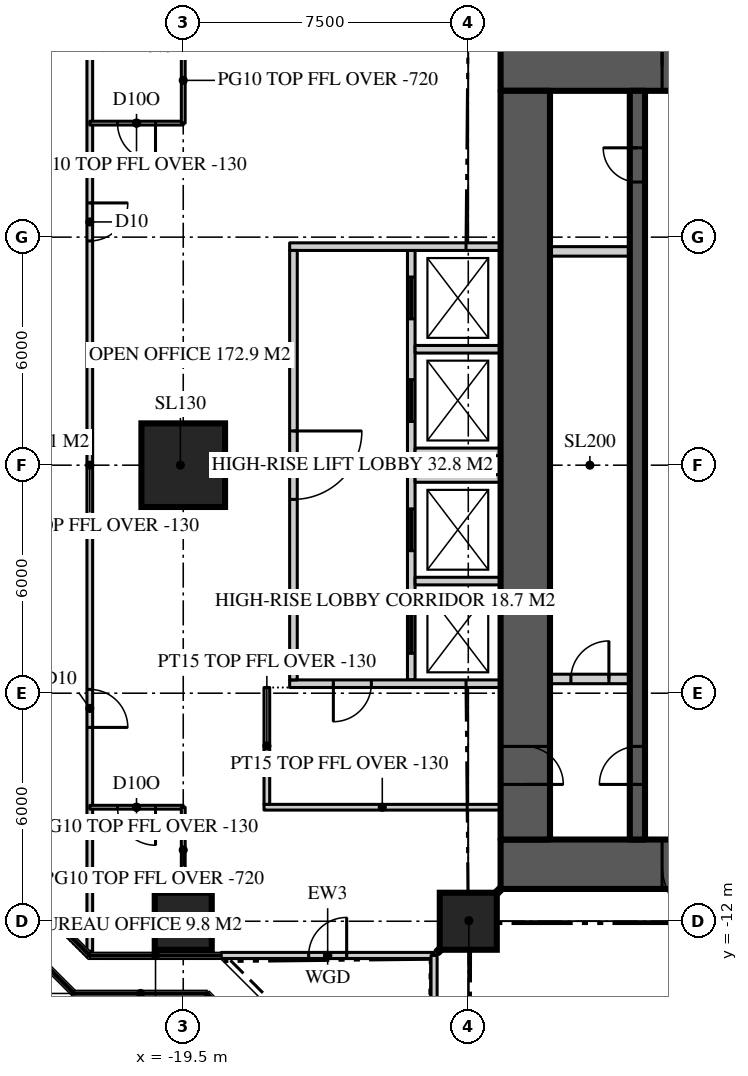
"""IFC4 building model, lengths in metres.
Left out: names, types, materials, properties, quantities, classifications, styles, units other than length and angle.
Written with IfcOpenShell. Run it as: python <this file> out.ifc"""

import sys

from ifc_helpers import new_model, si_unit, direction, frame, frame_2d, origin, origin_2d, place, context, subcontext, project, spatial, rectangle, extrude, element, fill, save


model = new_model("IFC4")
c1 = context("Model", 3, precision=1e-05, world=origin(), true_north=direction((0.0, 1.0)))
c2 = subcontext(c1, "Body", "Model", "MODEL_VIEW")
j1 = project(units=[si_unit("LENGTHUNIT", "METRE"), si_unit("PLANEANGLEUNIT", "RADIAN")], contexts=[c1])
p1 = place(None, origin())
s1 = spatial("IfcSite", under=j1, at=p1, CompositionType="ELEMENT")
p2 = place(p1, origin())
s2 = spatial("IfcBuilding", under=s1, at=p2, CompositionType="ELEMENT")
p3 = place(p2, frame((0.0, 0.0, 243.9)))
s3 = spatial("IfcBuildingStorey", under=s2, at=p3, CompositionType="ELEMENT", Elevation=243.9)
p4 = place(p3, frame((-11.15, 10.5, 0.0), z_axis=(0.0, 0.0, 1.0), x_axis=(1.0, 0.0, 0.0)))
e1 = element("IfcWall", 1, at=p4, inside=s3, PredefinedType="SHEAR", context=c2, shape_type="SweptSolid", body=[
    extrude(rectangle(XDim=22.3, YDim=1.3, at=frame_2d((11.15, 0.0))), origin(), (0.0, 0.0, 1.0), 3.9),
])
p5 = place(p4, frame((4.25, 0.0, 0.0)))
e2 = element("IfcOpeningElement", 2, at=p5, cuts=e1, PredefinedType="OPENING", context=c2, shape_type="SweptSolid", body=[
    extrude(rectangle(XDim=1.8, YDim=2.2, at=frame_2d((0.9, 1.1))), frame((0.0, 0.66, 0.0), z_axis=(0.0, -1.0, 0.0), x_axis=(1.0, 0.0, 0.0)), (0.0, 0.0, 1.0), 1.32),
])
p6 = place(p4, frame((16.25, 0.0, 0.0)))
e3 = element("IfcOpeningElement", 3, at=p6, cuts=e1, PredefinedType="OPENING", context=c2, shape_type="SweptSolid", body=[
    extrude(rectangle(XDim=1.8, YDim=2.2, at=frame_2d((0.9, 1.1))), frame((0.0, 0.66, 0.0), z_axis=(0.0, -1.0, 0.0), x_axis=(1.0, 0.0, 0.0)), (0.0, 0.0, 1.0), 1.32),
])
p7 = place(p3, frame((11.15, -10.5, 0.0), z_axis=(0.0, 0.0, 1.0), x_axis=(-1.0, 0.0, 0.0)))
e4 = element("IfcWall", 4, at=p7, inside=s3, PredefinedType="SHEAR", context=c2, shape_type="SweptSolid", body=[
    extrude(rectangle(XDim=22.3, YDim=1.3, at=frame_2d((11.15, 0.0))), origin(), (0.0, 0.0, 1.0), 3.9),
])
p8 = place(p7, frame((16.25, 0.0, 0.0)))
e5 = element("IfcOpeningElement", 5, at=p8, cuts=e4, PredefinedType="OPENING", context=c2, shape_type="SweptSolid", body=[
    extrude(rectangle(XDim=1.8, YDim=2.2, at=frame_2d((0.9, 1.1))), frame((0.0, 0.66, 0.0), z_axis=(0.0, -1.0, 0.0), x_axis=(1.0, 0.0, 0.0)), (0.0, 0.0, 1.0), 1.32),
])
p9 = place(p7, frame((4.25, 0.0, 0.0)))
e6 = element("IfcOpeningElement", 6, at=p9, cuts=e4, PredefinedType="OPENING", context=c2, shape_type="SweptSolid", body=[
    extrude(rectangle(XDim=1.8, YDim=2.2, at=frame_2d((0.9, 1.1))), frame((0.0, 0.66, 0.0), z_axis=(0.0, -1.0, 0.0), x_axis=(1.0, 0.0, 0.0)), (0.0, 0.0, 1.0), 1.32),
])
p10 = place(p3, frame((-10.5, 9.85, 0.0), z_axis=(0.0, 0.0, 1.0), x_axis=(0.0, -1.0, 0.0)))
e7 = element("IfcWall", 7, at=p10, inside=s3, PredefinedType="SHEAR", context=c2, shape_type="SweptSolid", body=[
    extrude(rectangle(XDim=19.7, YDim=1.3, at=frame_2d((9.85, 0.0))), origin(), (0.0, 0.0, 1.0), 3.9),
])
p11 = place(p10, frame((17.25, 0.0, 0.0)))
e8 = element("IfcOpeningElement", 8, at=p11, cuts=e7, PredefinedType="OPENING", context=c2, shape_type="SweptSolid", body=[
    extrude(rectangle(XDim=1.0, YDim=2.2, at=frame_2d((0.5, 1.1))), frame((0.0, 0.66, 0.0), z_axis=(0.0, -1.0, 0.0), x_axis=(1.0, 0.0, 0.0)), (0.0, 0.0, 1.0), 1.32),
])
for number, where, z_axis, x_axis in (
    (9, (-19.5, -12.0, 0.0), (0.0, 0.0, 1.0), (1.0, 0.0, 0.0)),
    (10, (-12.0, -12.0, 0.0), (0.0, 0.0, 1.0), (1.0, 0.0, 0.0)),
):
    element("IfcColumn", number, at=place(p3, frame(where, z_axis=z_axis, x_axis=x_axis)), inside=s3, PredefinedType="COLUMN", context=c2, shape_type="SweptSolid", body=[
        extrude(rectangle(XDim=1.5, YDim=1.5, at=origin_2d()), origin(), (0.0, 0.0, 1.0), 3.9),
    ])
p12 = place(p3, frame((-19.5, 0.0, 0.0), z_axis=(0.0, 0.0, 1.0), x_axis=(1.0, 0.0, 0.0)))
e11 = element("IfcColumn", 11, at=p12, inside=s3, PredefinedType="COLUMN", context=c2, shape_type="SweptSolid", body=[
    extrude(rectangle(XDim=2.2, YDim=2.2, at=origin_2d()), origin(), (0.0, 0.0, 1.0), 3.9),
])
p13 = place(p3, frame((-18.5, -12.9, 0.0), z_axis=(0.0, 0.0, 1.0), x_axis=(1.0, 0.0, 0.0)))
e12 = element("IfcWall", 12, at=p13, inside=s3, PredefinedType="SOLIDWALL", context=c2, shape_type="SweptSolid", body=[
    extrude(rectangle(XDim=5.6, YDim=0.16, at=frame_2d((2.8, 0.0))), origin(), (0.0, 0.0, 1.0), 3.77),
])
p14 = place(p13, frame((2.3, 0.0, 0.0)))
e13 = element("IfcOpeningElement", 13, at=p14, cuts=e12, PredefinedType="OPENING", context=c2, shape_type="SweptSolid", body=[
    extrude(rectangle(XDim=1.0, YDim=2.2, at=frame_2d((0.5, 1.1))), frame((0.0, 0.09, 0.0), z_axis=(0.0, -1.0, 0.0), x_axis=(1.0, 0.0, 0.0)), (0.0, 0.0, 1.0), 0.18),
])
p15 = place(p3, frame((-12.9, -12.9, 0.0), z_axis=(0.0, 0.0, 1.0), x_axis=(0.0, -1.0, 0.0)))
e14 = element("IfcWall", 14, at=p15, inside=s3, PredefinedType="SOLIDWALL", context=c2, shape_type="SweptSolid", body=[
    extrude(rectangle(XDim=5.6, YDim=0.16, at=frame_2d((2.8, 0.0))), origin(), (0.0, 0.0, 1.0), 3.77),
])
p16 = place(p3, frame((-7.55, -9.85, 0.0), z_axis=(0.0, 0.0, 1.0), x_axis=(0.0, 1.0, 0.0)))
e15 = element("IfcWall", 15, at=p16, inside=s3, PredefinedType="SHEAR", context=c2, shape_type="SweptSolid", body=[
    extrude(rectangle(XDim=19.7, YDim=0.4, at=frame_2d((9.85, 0.0))), origin(), (0.0, 0.0, 1.0), 3.9),
])
p17 = place(p16, frame((1.45, 0.0, 0.0)))
e16 = element("IfcOpeningElement", 16, at=p17, cuts=e15, PredefinedType="OPENING", context=c2, shape_type="SweptSolid", body=[
    extrude(rectangle(XDim=1.0, YDim=2.2, at=frame_2d((0.5, 1.1))), frame((0.0, 0.21, 0.0), z_axis=(0.0, -1.0, 0.0), x_axis=(1.0, 0.0, 0.0)), (0.0, 0.0, 1.0), 0.42),
])
p18 = place(p16, frame((17.3, 0.0, 0.0)))
e17 = element("IfcOpeningElement", 17, at=p18, cuts=e15, PredefinedType="OPENING", context=c2, shape_type="SweptSolid", body=[
    extrude(rectangle(XDim=0.9, YDim=2.1, at=frame_2d((0.45, 1.05))), frame((0.0, 0.21, 0.0), z_axis=(0.0, -1.0, 0.0), x_axis=(1.0, 0.0, 0.0)), (0.0, 0.0, 1.0), 0.42),
])
p19 = place(p3, frame((-9.85, 5.625, 0.0), z_axis=(0.0, 0.0, 1.0), x_axis=(1.0, 0.0, 0.0)))
e18 = element("IfcWall", 18, at=p19, inside=s3, PredefinedType="SOLIDWALL", context=c2, shape_type="SweptSolid", body=[
    extrude(rectangle(XDim=2.1, YDim=0.25, at=frame_2d((1.05, 0.0))), origin(), (0.0, 0.0, 1.0), 3.7),
])
p20 = place(p3, frame((-9.85, -5.625, 0.0), z_axis=(0.0, 0.0, 1.0), x_axis=(1.0, 0.0, 0.0)))
e19 = element("IfcWall", 19, at=p20, inside=s3, PredefinedType="SOLIDWALL", context=c2, shape_type="SweptSolid", body=[
    extrude(rectangle(XDim=2.1, YDim=0.25, at=frame_2d((1.05, 0.0))), origin(), (0.0, 0.0, 1.0), 3.7),
])
p21 = place(p20, frame((0.55, 0.0, 0.0)))
e20 = element("IfcOpeningElement", 20, at=p21, cuts=e19, PredefinedType="OPENING", context=c2, shape_type="SweptSolid", body=[
    extrude(rectangle(XDim=1.0, YDim=2.2, at=frame_2d((0.5, 1.1))), frame((0.0, 0.135, 0.0), z_axis=(0.0, -1.0, 0.0), x_axis=(1.0, 0.0, 0.0)), (0.0, 0.0, 1.0), 0.27),
])
p22 = place(p3, frame((-21.959, 12.786, 0.0), z_axis=(0.0, 0.0, 1.0), x_axis=(0.0, -1.0, 0.0)))
e21 = element("IfcWall", 21, at=p22, inside=s3, PredefinedType="PARTITIONING", context=c2, shape_type="SweptSolid", body=[
    extrude(rectangle(XDim=25.573, YDim=0.15, at=frame_2d((12.786, 0.0))), origin(), (0.0, 0.0, 1.0), 3.77),
])
p23 = place(p22, frame((18.687, 0.0, 0.0)))
e22 = element("IfcOpeningElement", 22, at=p23, cuts=e21, PredefinedType="OPENING", context=c2, shape_type="SweptSolid", body=[
    extrude(rectangle(XDim=1.0, YDim=2.2, at=frame_2d((0.5, 1.1))), frame((0.0, 0.085, 0.0), z_axis=(0.0, -1.0, 0.0), x_axis=(1.0, 0.0, 0.0)), (0.0, 0.0, 1.0), 0.17),
])
p24 = place(p22, frame((5.886, 0.0, 0.0)))
e23 = element("IfcOpeningElement", 23, at=p24, cuts=e21, PredefinedType="OPENING", context=c2, shape_type="SweptSolid", body=[
    extrude(rectangle(XDim=1.0, YDim=2.2, at=frame_2d((0.5, 1.1))), frame((0.0, 0.085, 0.0), z_axis=(0.0, -1.0, 0.0), x_axis=(1.0, 0.0, 0.0)), (0.0, 0.0, 1.0), 0.17),
])
p25 = place(p3, frame((-19.5, -9.0, 0.0), z_axis=(0.0, 0.0, 1.0), x_axis=(-1.0, 0.0, 0.0)))
e24 = element("IfcWall", 24, at=p25, inside=s3, PredefinedType="PARTITIONING", context=c2, shape_type="SweptSolid", body=[
    extrude(rectangle(XDim=2.459, YDim=0.1, at=frame_2d((1.229, 0.0))), origin(), (0.0, 0.0, 1.0), 3.77),
])
p26 = place(p25, frame((0.729, 0.0, 0.0)))
e25 = element("IfcOpeningElement", 25, at=p26, cuts=e24, PredefinedType="OPENING", context=c2, shape_type="SweptSolid", body=[
    extrude(rectangle(XDim=1.0, YDim=2.2, at=frame_2d((0.5, 1.1))), frame((0.0, 0.06, 0.0), z_axis=(0.0, -1.0, 0.0), x_axis=(1.0, 0.0, 0.0)), (0.0, 0.0, 1.0), 0.12),
])
p27 = place(p3, frame((-19.5, -9.0, 0.0), z_axis=(0.0, 0.0, 1.0), x_axis=(0.0, -1.0, 0.0)))
e26 = element("IfcWall", 26, at=p27, inside=s3, PredefinedType="PARTITIONING", context=c2, shape_type="SweptSolid", body=[
    extrude(rectangle(XDim=2.25, YDim=0.1, at=frame_2d((1.125, 0.0))), origin(), (0.0, 0.0, 1.0), 3.18),
])
p28 = place(p3, frame((-19.5, 9.0, 0.0), z_axis=(0.0, 0.0, 1.0), x_axis=(-1.0, 0.0, 0.0)))
e27 = element("IfcWall", 27, at=p28, inside=s3, PredefinedType="PARTITIONING", context=c2, shape_type="SweptSolid", body=[
    extrude(rectangle(XDim=2.459, YDim=0.1, at=frame_2d((1.229, 0.0))), origin(), (0.0, 0.0, 1.0), 3.77),
])
p29 = place(p28, frame((0.729, 0.0, 0.0)))
e28 = element("IfcOpeningElement", 28, at=p29, cuts=e27, PredefinedType="OPENING", context=c2, shape_type="SweptSolid", body=[
    extrude(rectangle(XDim=1.0, YDim=2.2, at=frame_2d((0.5, 1.1))), frame((0.0, 0.06, 0.0), z_axis=(0.0, -1.0, 0.0), x_axis=(1.0, 0.0, 0.0)), (0.0, 0.0, 1.0), 0.12),
])
p30 = place(p3, frame((-19.5, 9.0, 0.0), z_axis=(0.0, 0.0, 1.0), x_axis=(0.0, 1.0, 0.0)))
e29 = element("IfcWall", 29, at=p30, inside=s3, PredefinedType="PARTITIONING", context=c2, shape_type="SweptSolid", body=[
    extrude(rectangle(XDim=2.25, YDim=0.1, at=frame_2d((1.125, 0.0))), origin(), (0.0, 0.0, 1.0), 3.18),
])
p31 = place(p3, frame((-13.5, 5.65, 0.0), z_axis=(0.0, 0.0, 1.0), x_axis=(0.0, -1.0, 0.0)))
e30 = element("IfcWall", 30, at=p31, inside=s3, PredefinedType="SOLIDWALL", context=c2, shape_type="SweptSolid", body=[
    extrude(rectangle(XDim=11.3, YDim=0.2, at=frame_2d((5.65, 0.0))), origin(), (0.0, 0.0, 1.0), 3.7),
])
p32 = place(p31, frame((0.7, 0.0, 0.0)))
e31 = element("IfcOpeningElement", 31, at=p32, cuts=e30, PredefinedType="OPENING", context=c2, shape_type="SweptSolid", body=[
    extrude(rectangle(XDim=1.1, YDim=2.2, at=frame_2d((0.55, 1.1))), frame((0.0, 0.11, 0.0), z_axis=(0.0, -1.0, 0.0), x_axis=(1.0, 0.0, 0.0)), (0.0, 0.0, 1.0), 0.22),
])
p33 = place(p31, frame((3.4, 0.0, 0.0)))
e32 = element("IfcOpeningElement", 32, at=p33, cuts=e30, PredefinedType="OPENING", context=c2, shape_type="SweptSolid", body=[
    extrude(rectangle(XDim=1.1, YDim=2.2, at=frame_2d((0.55, 1.1))), frame((0.0, 0.11, 0.0), z_axis=(0.0, -1.0, 0.0), x_axis=(1.0, 0.0, 0.0)), (0.0, 0.0, 1.0), 0.22),
])
p34 = place(p31, frame((6.8, 0.0, 0.0)))
e33 = element("IfcOpeningElement", 33, at=p34, cuts=e30, PredefinedType="OPENING", context=c2, shape_type="SweptSolid", body=[
    extrude(rectangle(XDim=1.1, YDim=2.2, at=frame_2d((0.55, 1.1))), frame((0.0, 0.11, 0.0), z_axis=(0.0, -1.0, 0.0), x_axis=(1.0, 0.0, 0.0)), (0.0, 0.0, 1.0), 0.22),
])
p35 = place(p31, frame((9.5, 0.0, 0.0)))
e34 = element("IfcOpeningElement", 34, at=p35, cuts=e30, PredefinedType="OPENING", context=c2, shape_type="SweptSolid", body=[
    extrude(rectangle(XDim=1.1, YDim=2.2, at=frame_2d((0.55, 1.1))), frame((0.0, 0.11, 0.0), z_axis=(0.0, -1.0, 0.0), x_axis=(1.0, 0.0, 0.0)), (0.0, 0.0, 1.0), 0.22),
])
p36 = place(p3, frame((-11.15, 5.75, 0.0), z_axis=(0.0, 0.0, 1.0), x_axis=(-1.0, 0.0, 0.0)))
e35 = element("IfcWall", 35, at=p36, inside=s3, PredefinedType="SOLIDWALL", context=c2, shape_type="SweptSolid", body=[
    extrude(rectangle(XDim=5.55, YDim=0.2, at=frame_2d((2.775, 0.0))), origin(), (0.0, 0.0, 1.0), 3.7),
])
p37 = place(p3, frame((-11.15, -5.75, 0.0), z_axis=(0.0, 0.0, 1.0), x_axis=(-1.0, 0.0, 0.0)))
e36 = element("IfcWall", 36, at=p37, inside=s3, PredefinedType="SOLIDWALL", context=c2, shape_type="SweptSolid", body=[
    extrude(rectangle(XDim=5.55, YDim=0.2, at=frame_2d((2.775, 0.0))), origin(), (0.0, 0.0, 1.0), 3.7),
])
p38 = place(p37, frame((3.4, 0.0, 0.0)))
e37 = element("IfcOpeningElement", 37, at=p38, cuts=e36, PredefinedType="OPENING", context=c2, shape_type="SweptSolid", body=[
    extrude(rectangle(XDim=1.0, YDim=2.2, at=frame_2d((0.5, 1.1))), frame((0.0, 0.11, 0.0), z_axis=(0.0, -1.0, 0.0), x_axis=(1.0, 0.0, 0.0)), (0.0, 0.0, 1.0), 0.22),
])
for number, where, z_axis, x_axis in (
    (38, (-11.15, 3.05, 0.0), (0.0, 0.0, 1.0), (-1.0, 0.0, 0.0)),
    (39, (-11.15, 0.35, 0.0), (0.0, 0.0, 1.0), (-1.0, 0.0, 0.0)),
    (40, (-11.15, -0.35, 0.0), (0.0, 0.0, 1.0), (-1.0, 0.0, 0.0)),
    (41, (-11.15, -3.05, 0.0), (0.0, 0.0, 1.0), (-1.0, 0.0, 0.0)),
):
    element("IfcWall", number, at=place(p3, frame(where, z_axis=z_axis, x_axis=x_axis)), inside=s3, PredefinedType="SOLIDWALL", context=c2, shape_type="SweptSolid", body=[
        extrude(rectangle(XDim=2.25, YDim=0.2, at=frame_2d((1.125, 0.0))), origin(), (0.0, 0.0, 1.0), 3.7),
    ])
p39 = place(p3, frame((-16.6, 5.65, 0.0), z_axis=(0.0, 0.0, 1.0), x_axis=(0.0, -1.0, 0.0)))
e42 = element("IfcWall", 42, at=p39, inside=s3, PredefinedType="SOLIDWALL", context=c2, shape_type="SweptSolid", body=[
    extrude(rectangle(XDim=11.3, YDim=0.2, at=frame_2d((5.65, 0.0))), origin(), (0.0, 0.0, 1.0), 3.18),
])
p40 = place(p39, frame((4.75, 0.0, 0.0)))
e43 = element("IfcOpeningElement", 43, at=p40, cuts=e42, PredefinedType="OPENING", context=c2, shape_type="SweptSolid", body=[
    extrude(rectangle(XDim=1.8, YDim=2.2, at=frame_2d((0.9, 1.1))), frame((0.0, 0.11, 0.0), z_axis=(0.0, -1.0, 0.0), x_axis=(1.0, 0.0, 0.0)), (0.0, 0.0, 1.0), 0.22),
])
p41 = place(p3, frame((-11.15, -11.15, 0.0), z_axis=(0.0, 0.0, 1.0), x_axis=(-0.707106781187, -0.707106781187, 0.0)))
e44 = element("IfcWall", 44, at=p41, inside=s3, PredefinedType="PARTITIONING", context=c2, shape_type="SweptSolid", body=[
    extrude(rectangle(XDim=2.362, YDim=0.15, at=frame_2d((1.181, 0.0))), origin(), (0.0, 0.0, 1.0), 3.22),
])
p42 = place(p3, frame((-11.15, -9.0, 0.0), z_axis=(0.0, 0.0, 1.0), x_axis=(-1.0, 0.0, 0.0)))
e45 = element("IfcWall", 45, at=p42, inside=s3, PredefinedType="PARTITIONING", context=c2, shape_type="SweptSolid", body=[
    extrude(rectangle(XDim=6.225, YDim=0.15, at=frame_2d((3.113, 0.0))), origin(), (0.0, 0.0, 1.0), 3.77),
])
p43 = place(p3, frame((-17.3, -5.85, 0.0), z_axis=(0.0, 0.0, 1.0), x_axis=(0.0, -1.0, 0.0)))
e46 = element("IfcWall", 46, at=p43, inside=s3, PredefinedType="PARTITIONING", context=c2, shape_type="SweptSolid", body=[
    extrude(rectangle(XDim=3.075, YDim=0.15, at=frame_2d((1.538, 0.0))), origin(), (0.0, 0.0, 1.0), 3.77),
])
p44 = place(p14, origin())
e47 = element("IfcDoor", 47, at=p44, inside=s3, OperationType="SINGLE_SWING_RIGHT", PredefinedType="DOOR", context=c2, shape_type="SweptSolid", body=[
    extrude(rectangle(XDim=1.0, YDim=2.2, at=frame_2d((0.5, 1.1))), frame((0.0, 0.025, 0.0), z_axis=(0.0, -1.0, 0.0), x_axis=(1.0, 0.0, 0.0)), (0.0, 0.0, 1.0), 0.05),
])
fill(e13, e47)
p45 = place(p5, origin())
e48 = element("IfcDoor", 48, at=p45, inside=s3, OperationType="DOUBLE_DOOR_DOUBLE_SWING", PredefinedType="DOOR", context=c2, shape_type="SweptSolid", body=[
    extrude(rectangle(XDim=1.8, YDim=2.2, at=frame_2d((0.9, 1.1))), frame((0.0, 0.025, 0.0), z_axis=(0.0, -1.0, 0.0), x_axis=(1.0, 0.0, 0.0)), (0.0, 0.0, 1.0), 0.05),
])
fill(e2, e48)
p46 = place(p8, origin())
e49 = element("IfcDoor", 49, at=p46, inside=s3, OperationType="DOUBLE_DOOR_DOUBLE_SWING", PredefinedType="DOOR", context=c2, shape_type="SweptSolid", body=[
    extrude(rectangle(XDim=1.8, YDim=2.2, at=frame_2d((0.9, 1.1))), frame((0.0, 0.025, 0.0), z_axis=(0.0, -1.0, 0.0), x_axis=(1.0, 0.0, 0.0)), (0.0, 0.0, 1.0), 0.05),
])
fill(e5, e49)
p47 = place(p17, origin())
e50 = element("IfcDoor", 50, at=p47, inside=s3, OperationType="SINGLE_SWING_LEFT", PredefinedType="DOOR", context=c2, shape_type="SweptSolid", body=[
    extrude(rectangle(XDim=1.0, YDim=2.2, at=frame_2d((0.5, 1.1))), frame((0.0, 0.025, 0.0), z_axis=(0.0, -1.0, 0.0), x_axis=(1.0, 0.0, 0.0)), (0.0, 0.0, 1.0), 0.05),
])
fill(e16, e50)
p48 = place(p11, origin())
e51 = element("IfcDoor", 51, at=p48, inside=s3, OperationType="SINGLE_SWING_RIGHT", PredefinedType="DOOR", context=c2, shape_type="SweptSolid", body=[
    extrude(rectangle(XDim=1.0, YDim=2.2, at=frame_2d((0.5, 1.1))), frame((0.0, 0.025, 0.0), z_axis=(0.0, -1.0, 0.0), x_axis=(1.0, 0.0, 0.0)), (0.0, 0.0, 1.0), 0.05),
])
fill(e8, e51)
p49 = place(p18, origin())
e52 = element("IfcDoor", 52, at=p49, inside=s3, OperationType="SINGLE_SWING_RIGHT", PredefinedType="DOOR", context=c2, shape_type="SweptSolid", body=[
    extrude(rectangle(XDim=0.9, YDim=2.1, at=frame_2d((0.45, 1.05))), frame((0.0, 0.025, 0.0), z_axis=(0.0, -1.0, 0.0), x_axis=(1.0, 0.0, 0.0)), (0.0, 0.0, 1.0), 0.05),
])
fill(e17, e52)
p50 = place(p23, origin())
e53 = element("IfcDoor", 53, at=p50, inside=s3, OperationType="SINGLE_SWING_RIGHT", PredefinedType="DOOR", context=c2, shape_type="SweptSolid", body=[
    extrude(rectangle(XDim=1.0, YDim=2.2, at=frame_2d((0.5, 1.1))), frame((0.0, 0.025, 0.0), z_axis=(0.0, -1.0, 0.0), x_axis=(1.0, 0.0, 0.0)), (0.0, 0.0, 1.0), 0.05),
])
fill(e22, e53)
p51 = place(p24, origin())
e54 = element("IfcDoor", 54, at=p51, inside=s3, OperationType="SINGLE_SWING_LEFT", PredefinedType="DOOR", context=c2, shape_type="SweptSolid", body=[
    extrude(rectangle(XDim=1.0, YDim=2.2, at=frame_2d((0.5, 1.1))), frame((0.0, 0.025, 0.0), z_axis=(0.0, -1.0, 0.0), x_axis=(1.0, 0.0, 0.0)), (0.0, 0.0, 1.0), 0.05),
])
fill(e23, e54)
p52 = place(p26, origin())
e55 = element("IfcDoor", 55, at=p52, inside=s3, OperationType="SINGLE_SWING_LEFT", PredefinedType="DOOR", context=c2, shape_type="SweptSolid", body=[
    extrude(rectangle(XDim=1.0, YDim=2.2, at=frame_2d((0.5, 1.1))), frame((0.0, 0.025, 0.0), z_axis=(0.0, -1.0, 0.0), x_axis=(1.0, 0.0, 0.0)), (0.0, 0.0, 1.0), 0.05),
])
fill(e25, e55)
p53 = place(p29, origin())
e56 = element("IfcDoor", 56, at=p53, inside=s3, OperationType="SINGLE_SWING_LEFT", PredefinedType="DOOR", context=c2, shape_type="SweptSolid", body=[
    extrude(rectangle(XDim=1.0, YDim=2.2, at=frame_2d((0.5, 1.1))), frame((0.0, 0.025, 0.0), z_axis=(0.0, -1.0, 0.0), x_axis=(1.0, 0.0, 0.0)), (0.0, 0.0, 1.0), 0.05),
])
fill(e28, e56)
p54 = place(p40, origin())
e57 = element("IfcDoor", 57, at=p54, inside=s3, OperationType="DOUBLE_DOOR_DOUBLE_SWING", PredefinedType="DOOR", context=c2, shape_type="SweptSolid", body=[
    extrude(rectangle(XDim=1.8, YDim=2.2, at=frame_2d((0.9, 1.1))), frame((0.0, 0.025, 0.0), z_axis=(0.0, -1.0, 0.0), x_axis=(1.0, 0.0, 0.0)), (0.0, 0.0, 1.0), 0.05),
])
fill(e43, e57)
p55 = place(p32, origin())
e58 = element("IfcDoor", 58, at=p55, inside=s3, OperationType="SLIDING_TO_LEFT", PredefinedType="DOOR", context=c2, shape_type="SweptSolid", body=[
    extrude(rectangle(XDim=1.1, YDim=2.2, at=frame_2d((0.55, 1.1))), frame((0.0, 0.025, 0.0), z_axis=(0.0, -1.0, 0.0), x_axis=(1.0, 0.0, 0.0)), (0.0, 0.0, 1.0), 0.05),
])
fill(e31, e58)
p56 = place(p33, origin())
e59 = element("IfcDoor", 59, at=p56, inside=s3, OperationType="SLIDING_TO_LEFT", PredefinedType="DOOR", context=c2, shape_type="SweptSolid", body=[
    extrude(rectangle(XDim=1.1, YDim=2.2, at=frame_2d((0.55, 1.1))), frame((0.0, 0.025, 0.0), z_axis=(0.0, -1.0, 0.0), x_axis=(1.0, 0.0, 0.0)), (0.0, 0.0, 1.0), 0.05),
])
fill(e32, e59)
p57 = place(p34, origin())
e60 = element("IfcDoor", 60, at=p57, inside=s3, OperationType="SLIDING_TO_LEFT", PredefinedType="DOOR", context=c2, shape_type="SweptSolid", body=[
    extrude(rectangle(XDim=1.1, YDim=2.2, at=frame_2d((0.55, 1.1))), frame((0.0, 0.025, 0.0), z_axis=(0.0, -1.0, 0.0), x_axis=(1.0, 0.0, 0.0)), (0.0, 0.0, 1.0), 0.05),
])
fill(e33, e60)
p58 = place(p35, origin())
e61 = element("IfcDoor", 61, at=p58, inside=s3, OperationType="SLIDING_TO_LEFT", PredefinedType="DOOR", context=c2, shape_type="SweptSolid", body=[
    extrude(rectangle(XDim=1.1, YDim=2.2, at=frame_2d((0.55, 1.1))), frame((0.0, 0.025, 0.0), z_axis=(0.0, -1.0, 0.0), x_axis=(1.0, 0.0, 0.0)), (0.0, 0.0, 1.0), 0.05),
])
fill(e34, e61)
p59 = place(p38, origin())
e62 = element("IfcDoor", 62, at=p59, inside=s3, OperationType="SINGLE_SWING_RIGHT", PredefinedType="DOOR", context=c2, shape_type="SweptSolid", body=[
    extrude(rectangle(XDim=1.0, YDim=2.2, at=frame_2d((0.5, 1.1))), frame((0.0, 0.025, 0.0), z_axis=(0.0, -1.0, 0.0), x_axis=(1.0, 0.0, 0.0)), (0.0, 0.0, 1.0), 0.05),
])
fill(e37, e62)
p60 = place(p21, origin())
e63 = element("IfcDoor", 63, at=p60, inside=s3, OperationType="SINGLE_SWING_RIGHT", PredefinedType="DOOR", context=c2, shape_type="SweptSolid", body=[
    extrude(rectangle(XDim=1.0, YDim=2.2, at=frame_2d((0.5, 1.1))), frame((0.0, 0.025, 0.0), z_axis=(0.0, -1.0, 0.0), x_axis=(1.0, 0.0, 0.0)), (0.0, 0.0, 1.0), 0.05),
])
fill(e20, e63)
save(model, sys.argv[1])
